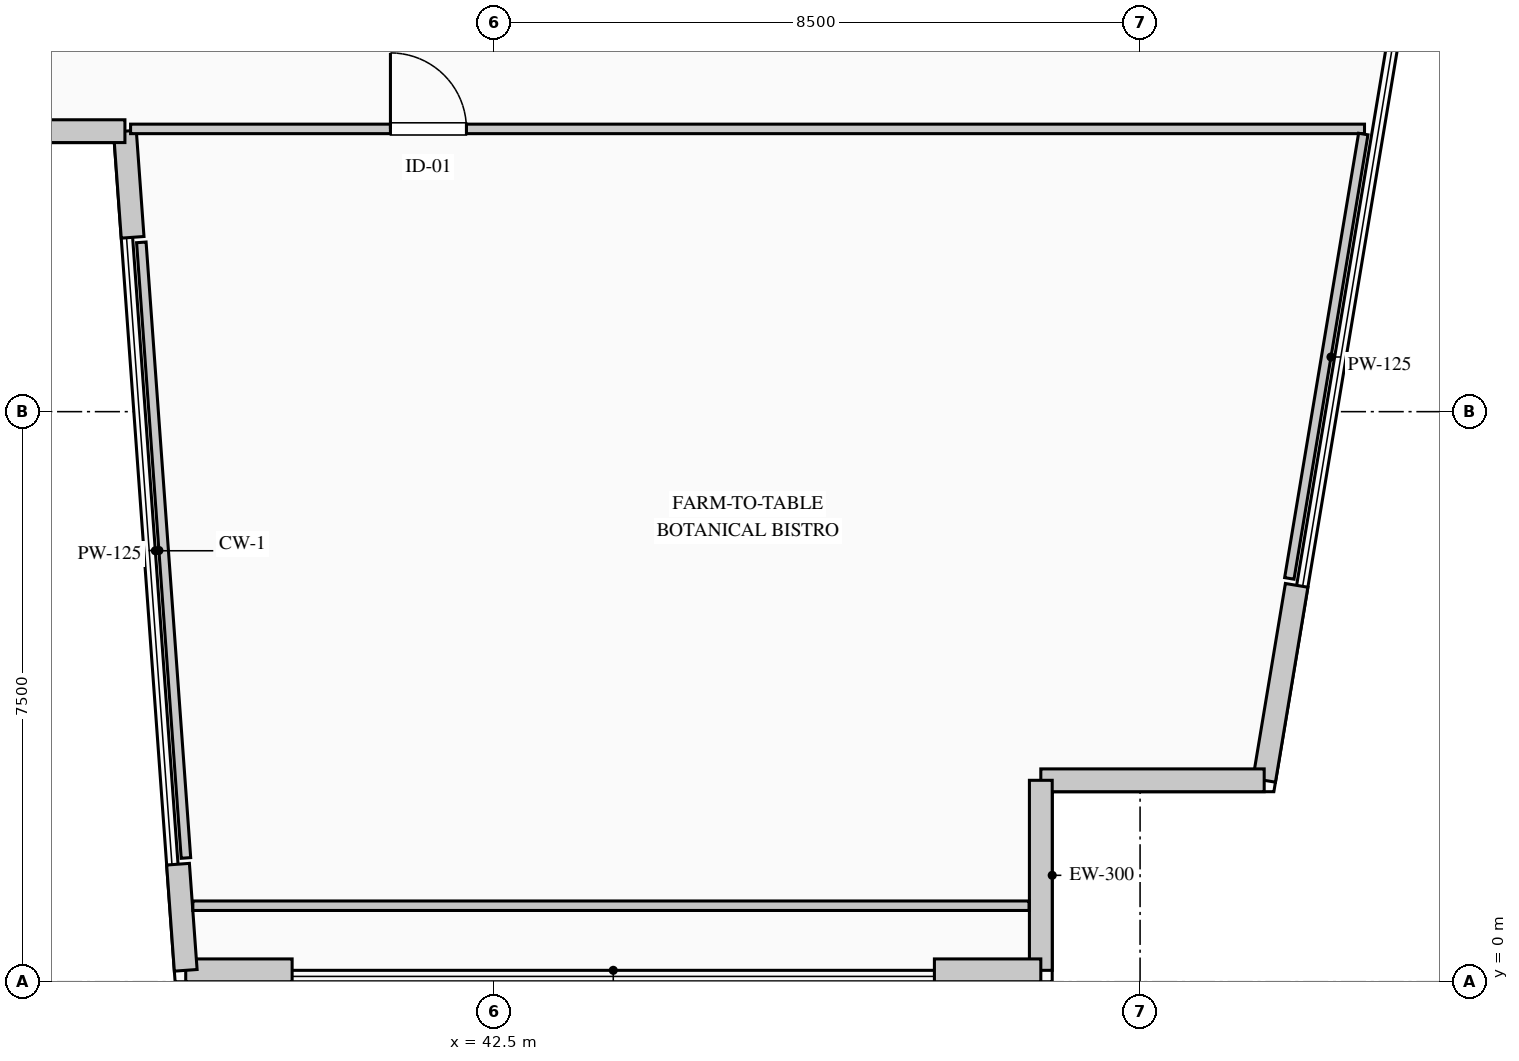
"""IFC4 building model, lengths in metres.
Left out: names, types, materials, properties, quantities, classifications, styles, units other than length and angle.
Written with IfcOpenShell. Run it as: python <this file> out.ifc"""

import sys

from ifc_helpers import new_model, si_unit, direction, frame, frame_2d, origin, place, context, subcontext, project, spatial, rectangle, extrude, element, fill, save


model = new_model("IFC4")
c1 = context("Model", 3, precision=1e-05, world=origin(), true_north=direction((0.0, 1.0)))
c2 = subcontext(c1, "Body", "Model", "MODEL_VIEW")
j1 = project(units=[si_unit("LENGTHUNIT", "METRE"), si_unit("PLANEANGLEUNIT", "RADIAN")], contexts=[c1])
p1 = place(None, origin())
s1 = spatial("IfcSite", under=j1, at=p1, CompositionType="ELEMENT")
p2 = place(p1, origin())
s2 = spatial("IfcBuilding", under=s1, at=p2, CompositionType="ELEMENT")
p3 = place(p2, frame((0.0, 0.0, 10.8)))
s3 = spatial("IfcBuildingStorey", under=s2, at=p3, CompositionType="ELEMENT", Elevation=10.8)
p4 = place(p3, frame((53.06, 5.215, 0.0), z_axis=(0.0, 0.0, 1.0), x_axis=(-0.164140117583, -0.986437033875, 0.0)))
e1 = element("IfcWall", 1, at=p4, inside=s3, PredefinedType="STANDARD", context=c2, shape_type="SweptSolid", body=[
    extrude(rectangle(XDim=2.6, YDim=0.3, at=frame_2d((1.3, 0.0))), origin(), (0.0, 0.0, 1.0), 5.08),
])
p5 = place(p3, frame((52.633, 2.65, 0.0), z_axis=(0.0, 0.0, 1.0), x_axis=(-1.0, 0.0, 0.0)))
e2 = element("IfcWall", 2, at=p5, inside=s3, PredefinedType="STANDARD", context=c2, shape_type="SweptSolid", body=[
    extrude(rectangle(XDim=2.939, YDim=0.3, at=frame_2d((1.469, 0.0))), origin(), (0.0, 0.0, 1.0), 5.08),
])
p6 = place(p3, frame((49.694, 2.65, 0.0), z_axis=(0.0, 0.0, 1.0), x_axis=(0.0, -1.0, 0.0)))
e3 = element("IfcWall", 3, at=p6, inside=s3, PredefinedType="STANDARD", context=c2, shape_type="SweptSolid", body=[
    extrude(rectangle(XDim=2.5, YDim=0.3, at=frame_2d((1.25, 0.0))), origin(), (0.0, 0.0, 1.0), 5.08),
])
p7 = place(p3, frame((49.694, 0.15, 0.0), z_axis=(0.0, 0.0, 1.0), x_axis=(-1.0, 0.0, 0.0)))
e4 = element("IfcWall", 4, at=p7, inside=s3, PredefinedType="STANDARD", context=c2, shape_type="SweptSolid", body=[
    extrude(rectangle(XDim=1.4, YDim=0.3, at=frame_2d((0.7, 0.0))), origin(), (0.0, 0.0, 1.0), 5.08),
])
p8 = place(p3, frame((39.844, 0.15, 0.0), z_axis=(0.0, 0.0, 1.0), x_axis=(-1.0, 0.0, 0.0)))
e5 = element("IfcWall", 5, at=p8, inside=s3, PredefinedType="STANDARD", context=c2, shape_type="SweptSolid", body=[
    extrude(rectangle(XDim=1.4, YDim=0.3, at=frame_2d((0.7, 0.0))), origin(), (0.0, 0.0, 1.0), 5.08),
])
p9 = place(p3, frame((38.444, 0.15, 0.0), z_axis=(0.0, 0.0, 1.0), x_axis=(-0.072362245244, 0.997378416381, 0.0)))
e6 = element("IfcWall", 6, at=p9, inside=s3, PredefinedType="STANDARD", context=c2, shape_type="SweptSolid", body=[
    extrude(rectangle(XDim=1.4, YDim=0.3, at=frame_2d((0.7, 0.0))), origin(), (0.0, 0.0, 1.0), 5.08),
])
p10 = place(p3, frame((37.745, 9.794, 0.0), z_axis=(0.0, 0.0, 1.0), x_axis=(-0.072201344972, 0.997390077043, 0.0)))
e7 = element("IfcWall", 7, at=p10, inside=s3, PredefinedType="STANDARD", context=c2, shape_type="SweptSolid", body=[
    extrude(rectangle(XDim=1.4, YDim=0.3, at=frame_2d((0.7, 0.0))), origin(), (0.0, 0.0, 1.0), 5.08),
])
p11 = place(p3, frame((37.644, 11.19, 0.0), z_axis=(0.0, 0.0, 1.0), x_axis=(-1.0, 0.0, 0.0)))
e8 = element("IfcWall", 8, at=p11, inside=s3, PredefinedType="STANDARD", context=c2, shape_type="SweptSolid", body=[
    extrude(rectangle(XDim=1.4, YDim=0.3, at=frame_2d((0.7, 0.0))), origin(), (0.0, 0.0, 1.0), 5.08),
])
p12 = place(p3, frame((49.539, 1.0, 0.0), z_axis=(0.0, 0.0, 1.0), x_axis=(-1.0, 0.0, 0.0)))
e9 = element("IfcWall", 9, at=p12, inside=s3, PredefinedType="PARTITIONING", context=c2, shape_type="SweptSolid", body=[
    extrude(rectangle(XDim=11.002, YDim=0.125, at=frame_2d((5.501, 0.0))), origin(), (0.0, 0.0, 1.0), 5.08),
])
p13 = place(p3, frame((38.446, 1.628, 0.0), z_axis=(0.0, 0.0, 1.0), x_axis=(-0.072249119519, 0.99738661748, 0.0)))
e10 = element("IfcWall", 10, at=p13, inside=s3, PredefinedType="PARTITIONING", context=c2, shape_type="SweptSolid", body=[
    extrude(rectangle(XDim=8.12, YDim=0.125, at=frame_2d((4.06, 0.0))), origin(), (0.0, 0.0, 1.0), 5.08),
])
p14 = place(p3, frame((37.718, 11.22, 0.0), z_axis=(0.0, 0.0, 1.0), x_axis=(1.0, 0.0, 0.0)))
e11 = element("IfcWall", 11, at=p14, inside=s3, PredefinedType="PARTITIONING", context=c2, shape_type="SweptSolid", body=[
    extrude(rectangle(XDim=16.235, YDim=0.125, at=frame_2d((8.117, 0.0))), origin(), (0.0, 0.0, 1.0), 5.08),
])
p15 = place(p14, frame((3.419, 0.0, 0.0)))
e12 = element("IfcOpeningElement", 12, at=p15, cuts=e11, PredefinedType="OPENING", context=c2, shape_type="SweptSolid", body=[
    extrude(rectangle(XDim=1.0, YDim=2.15, at=frame_2d((0.5, 1.075))), frame((0.0, 0.073, 0.0), z_axis=(0.0, -1.0, 0.0), x_axis=(1.0, 0.0, 0.0)), (0.0, 0.0, 1.0), 0.145),
])
p16 = place(p3, frame((53.937, 11.153, 0.0), z_axis=(0.0, 0.0, 1.0), x_axis=(-0.164151827574, -0.986435085297, 0.0)))
e13 = element("IfcWall", 13, at=p16, inside=s3, PredefinedType="PARTITIONING", context=c2, shape_type="SweptSolid", body=[
    extrude(rectangle(XDim=5.927, YDim=0.125, at=frame_2d((2.963, 0.0))), origin(), (0.0, 0.0, 1.0), 5.08),
])
p17 = place(p15, origin())
e14 = element("IfcDoor", 14, at=p17, inside=s3, OperationType="SINGLE_SWING_LEFT", PredefinedType="DOOR", context=c2, shape_type="SweptSolid", body=[
    extrude(rectangle(XDim=1.0, YDim=2.15, at=frame_2d((0.5, 1.075))), frame((0.0, 0.025, 0.0), z_axis=(0.0, -1.0, 0.0), x_axis=(1.0, 0.0, 0.0)), (0.0, 0.0, 1.0), 0.05),
])
fill(e12, e14)
save(model, sys.argv[1])
